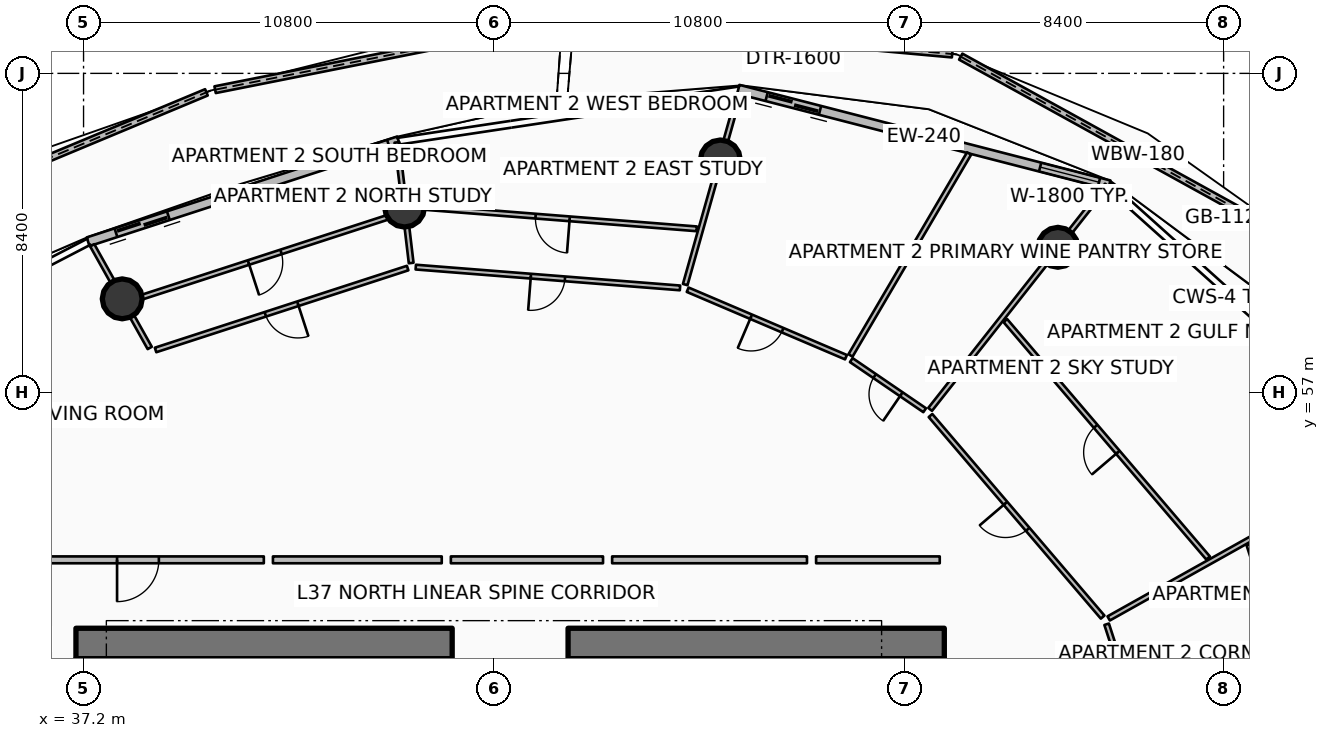
"""IFC4 building model, lengths in metres.
Left out: names, types, materials, properties, quantities, classifications, styles, units other than length and angle.
Written with IfcOpenShell. Run it as: python <this file> out.ifc"""

import sys

from ifc_helpers import new_model, si_unit, direction, frame, frame_2d, origin, origin_2d, place, context, subcontext, project, spatial, polyline, rectangle, circle, outline, extrude, element, fill, save


model = new_model("IFC4")
c1 = context("Model", 3, precision=1e-05, world=origin(), true_north=direction((0.0, 1.0)))
c2 = subcontext(c1, "Body", "Model", "MODEL_VIEW")
j1 = project(units=[si_unit("LENGTHUNIT", "METRE"), si_unit("PLANEANGLEUNIT", "RADIAN")], contexts=[c1])
p1 = place(None, origin())
s1 = spatial("IfcSite", under=j1, at=p1, CompositionType="ELEMENT")
p2 = place(p1, origin())
s2 = spatial("IfcBuilding", under=s1, at=p2, CompositionType="ELEMENT")
p3 = place(p2, frame((0.0, 0.0, 150.3)))
s3 = spatial("IfcBuildingStorey", under=s2, at=p3, CompositionType="ELEMENT", Elevation=150.3)
p4 = place(p3, frame((37.0, 50.4, 0.0), z_axis=(0.0, 0.0, 1.0), x_axis=(1.0, 0.0, 0.0)))
e1 = element("IfcWall", 1, at=p4, inside=s3, PredefinedType="SHEAR", context=c2, shape_type="SweptSolid", body=[
    extrude(rectangle(XDim=9.9, YDim=0.8, at=frame_2d((4.95, 0.0))), origin(), (0.0, 0.0, 1.0), 3.75),
])
p5 = place(p3, frame((49.95, 50.4, 0.0), z_axis=(0.0, 0.0, 1.0), x_axis=(1.0, 0.0, 0.0)))
e2 = element("IfcWall", 2, at=p5, inside=s3, PredefinedType="SHEAR", context=c2, shape_type="SweptSolid", body=[
    extrude(rectangle(XDim=9.9, YDim=0.8, at=frame_2d((4.95, 0.0))), origin(), (0.0, 0.0, 1.0), 3.75),
])
for number, where, z_axis, x_axis in (
    (3, (62.84, 60.824, 0.0), (0.0, 0.0, 1.0), (1.0, 0.0, 0.0)),
    (4, (53.957, 63.122, 0.0), (0.0, 0.0, 1.0), (1.0, 0.0, 0.0)),
    (5, (45.647, 61.881, 0.0), (0.0, 0.0, 1.0), (1.0, 0.0, 0.0)),
    (6, (38.218, 59.467, 0.0), (0.0, 0.0, 1.0), (1.0, 0.0, 0.0)),
):
    element("IfcColumn", number, at=place(p3, frame(where, z_axis=z_axis, x_axis=x_axis)), inside=s3, PredefinedType="COLUMN", context=c2, shape_type="SweptSolid", body=[
        extrude(circle(Radius=0.525, at=origin_2d()), origin(), (0.0, 0.0, 1.0), 3.5),
    ])
p6 = place(p3, frame((69.614, 60.689, 0.0), z_axis=(0.0, 0.0, 1.0), x_axis=(-0.875451711427, 0.483305597897, 0.0)))
e7 = element("IfcWall", 7, at=p6, inside=s3, PredefinedType="PARAPET", context=c2, shape_type="SweptSolid", body=[
    extrude(outline(polyline([(0.0, 0.0), (10.659, 0.0), (10.659, 1.148), (5.33, 1.127), (0.0, 1.224), (0.0, 0.0)])), frame((0.0, 0.09, 0.0), z_axis=(0.0, -1.0, 0.0), x_axis=(1.0, 0.0, 0.0)), (0.0, 0.0, 1.0), 0.18),
])
p7 = place(p3, frame((60.058, 65.909, 0.0), z_axis=(0.0, 0.0, 1.0), x_axis=(-0.995910609801, 0.09034410487, 0.0)))
e8 = element("IfcWall", 8, at=p7, inside=s3, PredefinedType="PARAPET", context=c2, shape_type="SweptSolid", body=[
    extrude(outline(polyline([(0.0, 0.0), (9.993, 0.0), (9.993, 1.483), (4.997, 1.284), (0.0, 1.148), (0.0, 0.0)])), frame((0.0, 0.09, 0.0), z_axis=(0.0, -1.0, 0.0), x_axis=(1.0, 0.0, 0.0)), (0.0, 0.0, 1.0), 0.18),
])
p8 = place(p3, frame((49.799, 66.787, 0.0), z_axis=(0.0, 0.0, 1.0), x_axis=(-0.980810829075, -0.194961836188, 0.0)))
e9 = element("IfcWall", 9, at=p8, inside=s3, PredefinedType="PARAPET", context=c2, shape_type="SweptSolid", body=[
    extrude(outline(polyline([(0.0, 0.0), (9.315, 0.0), (9.315, 1.832), (4.658, 1.696), (0.0, 1.497), (0.0, 0.0)])), frame((0.0, 0.09, 0.0), z_axis=(0.0, -1.0, 0.0), x_axis=(1.0, 0.0, 0.0)), (0.0, 0.0, 1.0), 0.18),
])
p9 = place(p3, frame((40.433, 64.901, 0.0), z_axis=(0.0, 0.0, 1.0), x_axis=(-0.922918869306, -0.384994494349, 0.0)))
e10 = element("IfcWall", 10, at=p9, inside=s3, PredefinedType="PARAPET", context=c2, shape_type="SweptSolid", body=[
    extrude(outline(polyline([(0.0, 0.0), (9.419, 0.0), (9.419, 1.756), (4.709, 1.853), (0.0, 1.832), (0.0, 0.0)])), frame((0.0, 0.09, 0.0), z_axis=(0.0, -1.0, 0.0), x_axis=(1.0, 0.0, 0.0)), (0.0, 0.0, 1.0), 0.18),
])
p10 = place(p3, frame((64.192, 62.466, 0.0), z_axis=(0.0, 0.0, 1.0), x_axis=(-0.968379685126, 0.249481032214, 0.0)))
e11 = element("IfcWall", 11, at=p10, inside=s3, PredefinedType="SOLIDWALL", context=c2, shape_type="SweptSolid", body=[
    extrude(rectangle(XDim=10.082, YDim=0.24, at=frame_2d((5.041, 0.0))), origin(), (0.0, 0.0, 1.0), 2.45),
])
p11 = place(p10, frame((7.862, 0.0, 0.0)))
e12 = element("IfcOpeningElement", 12, at=p11, cuts=e11, PredefinedType="OPENING", context=c2, shape_type="SweptSolid", body=[
    extrude(rectangle(XDim=1.45, YDim=2.15, at=frame_2d((0.725, 1.075))), frame((0.0, 0.13, 0.0), z_axis=(0.0, -1.0, 0.0), x_axis=(1.0, 0.0, 0.0)), (0.0, 0.0, 1.0), 0.26),
])
p12 = place(p10, frame((0.28, 0.0, 0.65)))
e13 = element("IfcOpeningElement", 13, at=p12, cuts=e11, PredefinedType="OPENING", context=c2, shape_type="SweptSolid", body=[
    extrude(rectangle(XDim=1.6, YDim=1.5, at=frame_2d((0.8, 0.75))), frame((0.0, 0.13, 0.0), z_axis=(0.0, -1.0, 0.0), x_axis=(1.0, 0.0, 0.0)), (0.0, 0.0, 1.0), 0.26),
])
p13 = place(p3, frame((45.49, 63.624, 0.0), z_axis=(0.0, 0.0, 1.0), x_axis=(-0.951046390632, -0.309048156224, 0.0)))
e14 = element("IfcWall", 14, at=p13, inside=s3, PredefinedType="SOLIDWALL", context=c2, shape_type="SweptSolid", body=[
    extrude(rectangle(XDim=8.59, YDim=0.24, at=frame_2d((4.295, 0.0))), origin(), (0.0, 0.0, 1.0), 2.45),
])
p14 = place(p13, frame((6.37, 0.0, 0.0)))
e15 = element("IfcOpeningElement", 15, at=p14, cuts=e14, PredefinedType="OPENING", context=c2, shape_type="SweptSolid", body=[
    extrude(rectangle(XDim=1.45, YDim=2.15, at=frame_2d((0.725, 1.075))), frame((0.0, 0.13, 0.0), z_axis=(0.0, -1.0, 0.0), x_axis=(1.0, 0.0, 0.0)), (0.0, 0.0, 1.0), 0.26),
])
p15 = place(p13, frame((0.28, 0.0, 0.65)))
e16 = element("IfcOpeningElement", 16, at=p15, cuts=e14, PredefinedType="OPENING", context=c2, shape_type="SweptSolid", body=[
    extrude(rectangle(XDim=1.6, YDim=1.5, at=frame_2d((0.8, 0.75))), frame((0.0, 0.13, 0.0), z_axis=(0.0, -1.0, 0.0), x_axis=(1.0, 0.0, 0.0)), (0.0, 0.0, 1.0), 0.26),
])
p16 = place(p3, frame((41.944, 52.6, 0.0), z_axis=(0.0, 0.0, 1.0), x_axis=(-1.0, 0.0, 0.0)))
e17 = element("IfcWall", 17, at=p16, inside=s3, PredefinedType="PARTITIONING", context=c2, shape_type="SweptSolid", body=[
    extrude(rectangle(XDim=6.624, YDim=0.18, at=frame_2d((3.312, 0.0))), origin(), (0.0, 0.0, 1.0), 2.94),
])
p17 = place(p16, frame((2.762, 0.0, 0.0)))
e18 = element("IfcOpeningElement", 18, at=p17, cuts=e17, PredefinedType="OPENING", context=c2, shape_type="SweptSolid", body=[
    extrude(rectangle(XDim=1.1, YDim=2.1, at=frame_2d((0.55, 1.05))), frame((0.0, 0.1, 0.0), z_axis=(0.0, -1.0, 0.0), x_axis=(1.0, 0.0, 0.0)), (0.0, 0.0, 1.0), 0.2),
])
p18 = place(p3, frame((66.277, 44.272, 0.0), z_axis=(0.0, 0.0, 1.0), x_axis=(-0.308993461661, 0.951064162215, 0.0)))
e19 = element("IfcWall", 19, at=p18, inside=s3, PredefinedType="PARTITIONING", context=c2, shape_type="SweptSolid", body=[
    extrude(rectangle(XDim=6.974, YDim=0.125, at=frame_2d((3.487, 0.0))), origin(), (0.0, 0.0, 1.0), 2.94),
])
p19 = place(p18, frame((3.037, 0.0, 0.0)))
e20 = element("IfcOpeningElement", 20, at=p19, cuts=e19, PredefinedType="OPENING", context=c2, shape_type="SweptSolid", body=[
    extrude(rectangle(XDim=0.9, YDim=2.08, at=frame_2d((0.45, 1.04))), frame((0.0, 0.073, 0.0), z_axis=(0.0, -1.0, 0.0), x_axis=(1.0, 0.0, 0.0)), (0.0, 0.0, 1.0), 0.145),
])
p20 = place(p3, frame((70.535, 44.776, 0.0), z_axis=(0.0, 0.0, 1.0), x_axis=(-0.309002443549, 0.951061244022, 0.0)))
e21 = element("IfcWall", 21, at=p20, inside=s3, PredefinedType="PARTITIONING", context=c2, shape_type="SweptSolid", body=[
    extrude(rectangle(XDim=8.647, YDim=0.125, at=frame_2d((4.324, 0.0))), origin(), (0.0, 0.0, 1.0), 2.94),
])
p21 = place(p20, frame((3.874, 0.0, 0.0)))
e22 = element("IfcOpeningElement", 22, at=p21, cuts=e21, PredefinedType="OPENING", context=c2, shape_type="SweptSolid", body=[
    extrude(rectangle(XDim=0.9, YDim=2.08, at=frame_2d((0.45, 1.04))), frame((0.0, 0.073, 0.0), z_axis=(0.0, -1.0, 0.0), x_axis=(1.0, 0.0, 0.0)), (0.0, 0.0, 1.0), 0.145),
])
p22 = place(p3, frame((59.73, 52.6, 0.0), z_axis=(0.0, 0.0, 1.0), x_axis=(-1.0, 0.0, 0.0)))
e23 = element("IfcWall", 23, at=p22, inside=s3, PredefinedType="PARTITIONING", context=c2, shape_type="SweptSolid", body=[
    extrude(rectangle(XDim=3.254, YDim=0.18, at=frame_2d((1.627, 0.0))), origin(), (0.0, 0.0, 1.0), 2.94),
])
p23 = place(p3, frame((64.175, 51.059, 0.0), z_axis=(0.0, 0.0, 1.0), x_axis=(0.872491881101, 0.488628608877, 0.0)))
e24 = element("IfcWall", 24, at=p23, inside=s3, PredefinedType="PARTITIONING", context=c2, shape_type="SweptSolid", body=[
    extrude(rectangle(XDim=8.247, YDim=0.125, at=frame_2d((4.124, 0.0))), origin(), (0.0, 0.0, 1.0), 2.94),
])
p24 = place(p3, frame((64.017, 51.093, 0.0), z_axis=(0.0, 0.0, 1.0), x_axis=(-0.649447060425, 0.76040680935, 0.0)))
e25 = element("IfcWall", 25, at=p24, inside=s3, PredefinedType="PARTITIONING", context=c2, shape_type="SweptSolid", body=[
    extrude(rectangle(XDim=6.975, YDim=0.125, at=frame_2d((3.487, 0.0))), origin(), (0.0, 0.0, 1.0), 2.94),
])
p25 = place(p24, frame((3.037, 0.0, 0.0)))
e26 = element("IfcOpeningElement", 26, at=p25, cuts=e25, PredefinedType="OPENING", context=c2, shape_type="SweptSolid", body=[
    extrude(rectangle(XDim=0.9, YDim=2.08, at=frame_2d((0.45, 1.04))), frame((0.0, 0.073, 0.0), z_axis=(0.0, -1.0, 0.0), x_axis=(1.0, 0.0, 0.0)), (0.0, 0.0, 1.0), 0.145),
])
p26 = place(p3, frame((66.792, 52.648, 0.0), z_axis=(0.0, 0.0, 1.0), x_axis=(-0.649446834215, 0.76040700255, 0.0)))
e27 = element("IfcWall", 27, at=p26, inside=s3, PredefinedType="PARTITIONING", context=c2, shape_type="SweptSolid", body=[
    extrude(rectangle(XDim=8.216, YDim=0.125, at=frame_2d((4.108, 0.0))), origin(), (0.0, 0.0, 1.0), 2.94),
])
p27 = place(p26, frame((3.658, 0.0, 0.0)))
e28 = element("IfcOpeningElement", 28, at=p27, cuts=e27, PredefinedType="OPENING", context=c2, shape_type="SweptSolid", body=[
    extrude(rectangle(XDim=0.9, YDim=2.08, at=frame_2d((0.45, 1.04))), frame((0.0, 0.073, 0.0), z_axis=(0.0, -1.0, 0.0), x_axis=(1.0, 0.0, 0.0)), (0.0, 0.0, 1.0), 0.145),
])
p28 = place(p3, frame((56.236, 52.6, 0.0), z_axis=(0.0, 0.0, 1.0), x_axis=(-1.0, 0.0, 0.0)))
e29 = element("IfcWall", 29, at=p28, inside=s3, PredefinedType="PARTITIONING", context=c2, shape_type="SweptSolid", body=[
    extrude(rectangle(XDim=5.127, YDim=0.18, at=frame_2d((2.563, 0.0))), origin(), (0.0, 0.0, 1.0), 2.94),
])
p29 = place(p3, frame((59.477, 56.559, 0.0), z_axis=(0.0, 0.0, 1.0), x_axis=(0.619110986016, 0.785303499925, 0.0)))
e30 = element("IfcWall", 30, at=p29, inside=s3, PredefinedType="PARTITIONING", context=c2, shape_type="SweptSolid", body=[
    extrude(rectangle(XDim=7.513, YDim=0.125, at=frame_2d((3.756, 0.0))), origin(), (0.0, 0.0, 1.0), 2.94),
])
p30 = place(p3, frame((57.382, 57.978, 0.0), z_axis=(0.0, 0.0, 1.0), x_axis=(0.506339561396, 0.862334186128, 0.0)))
e31 = element("IfcWall", 31, at=p30, inside=s3, PredefinedType="PARTITIONING", context=c2, shape_type="SweptSolid", body=[
    extrude(rectangle(XDim=6.163, YDim=0.125, at=frame_2d((3.081, 0.0))), origin(), (0.0, 0.0, 1.0), 2.94),
])
p31 = place(p3, frame((59.333, 56.537, 0.0), z_axis=(0.0, 0.0, 1.0), x_axis=(-0.825780816813, 0.563991172434, 0.0)))
e32 = element("IfcWall", 32, at=p31, inside=s3, PredefinedType="PARTITIONING", context=c2, shape_type="SweptSolid", body=[
    extrude(rectangle(XDim=2.338, YDim=0.125, at=frame_2d((1.169, 0.0))), origin(), (0.0, 0.0, 1.0), 2.94),
])
p32 = place(p31, frame((0.744, 0.0, 0.0)))
e33 = element("IfcOpeningElement", 33, at=p32, cuts=e32, PredefinedType="OPENING", context=c2, shape_type="SweptSolid", body=[
    extrude(rectangle(XDim=0.85, YDim=2.06, at=frame_2d((0.425, 1.03))), frame((0.0, 0.073, 0.0), z_axis=(0.0, -1.0, 0.0), x_axis=(1.0, 0.0, 0.0)), (0.0, 0.0, 1.0), 0.145),
])
p33 = place(p3, frame((57.263, 57.932, 0.0), z_axis=(0.0, 0.0, 1.0), x_axis=(-0.919910192906, 0.392129107549, 0.0)))
e34 = element("IfcWall", 34, at=p33, inside=s3, PredefinedType="PARTITIONING", context=c2, shape_type="SweptSolid", body=[
    extrude(rectangle(XDim=4.528, YDim=0.125, at=frame_2d((2.264, 0.0))), origin(), (0.0, 0.0, 1.0), 2.94),
])
p34 = place(p33, frame((1.814, 0.0, 0.0)))
e35 = element("IfcOpeningElement", 35, at=p34, cuts=e34, PredefinedType="OPENING", context=c2, shape_type="SweptSolid", body=[
    extrude(rectangle(XDim=0.9, YDim=2.08, at=frame_2d((0.45, 1.04))), frame((0.0, 0.073, 0.0), z_axis=(0.0, -1.0, 0.0), x_axis=(1.0, 0.0, 0.0)), (0.0, 0.0, 1.0), 0.145),
])
p35 = place(p3, frame((50.869, 52.6, 0.0), z_axis=(0.0, 0.0, 1.0), x_axis=(-1.0, 0.0, 0.0)))
e36 = element("IfcWall", 36, at=p35, inside=s3, PredefinedType="PARTITIONING", context=c2, shape_type="SweptSolid", body=[
    extrude(rectangle(XDim=4.004, YDim=0.18, at=frame_2d((2.002, 0.0))), origin(), (0.0, 0.0, 1.0), 2.94),
])
p36 = place(p3, frame((53.032, 59.843, 0.0), z_axis=(0.0, 0.0, 1.0), x_axis=(0.271445669276, 0.962453764412, 0.0)))
e37 = element("IfcWall", 37, at=p36, inside=s3, PredefinedType="PARTITIONING", context=c2, shape_type="SweptSolid", body=[
    extrude(rectangle(XDim=5.2, YDim=0.125, at=frame_2d((2.6, 0.0))), origin(), (0.0, 0.0, 1.0), 2.94),
])
p37 = place(p3, frame((52.896, 59.755, 0.0), z_axis=(0.0, 0.0, 1.0), x_axis=(-0.996918496177, 0.078444324085, 0.0)))
e38 = element("IfcWall", 38, at=p37, inside=s3, PredefinedType="PARTITIONING", context=c2, shape_type="SweptSolid", body=[
    extrude(rectangle(XDim=6.975, YDim=0.125, at=frame_2d((3.487, 0.0))), origin(), (0.0, 0.0, 1.0), 2.94),
])
p38 = place(p37, frame((3.037, 0.0, 0.0)))
e39 = element("IfcOpeningElement", 39, at=p38, cuts=e38, PredefinedType="OPENING", context=c2, shape_type="SweptSolid", body=[
    extrude(rectangle(XDim=0.9, YDim=2.08, at=frame_2d((0.45, 1.04))), frame((0.0, 0.073, 0.0), z_axis=(0.0, -1.0, 0.0), x_axis=(1.0, 0.0, 0.0)), (0.0, 0.0, 1.0), 0.145),
])
p39 = place(p3, frame((53.334, 61.31, 0.0), z_axis=(0.0, 0.0, 1.0), x_axis=(-0.996916945499, 0.078464028559, 0.0)))
e40 = element("IfcWall", 40, at=p39, inside=s3, PredefinedType="PARTITIONING", context=c2, shape_type="SweptSolid", body=[
    extrude(rectangle(XDim=7.604, YDim=0.125, at=frame_2d((3.802, 0.0))), origin(), (0.0, 0.0, 1.0), 2.94),
])
p40 = place(p39, frame((3.352, 0.0, 0.0)))
e41 = element("IfcOpeningElement", 41, at=p40, cuts=e40, PredefinedType="OPENING", context=c2, shape_type="SweptSolid", body=[
    extrude(rectangle(XDim=0.9, YDim=2.08, at=frame_2d((0.45, 1.04))), frame((0.0, 0.073, 0.0), z_axis=(0.0, -1.0, 0.0), x_axis=(1.0, 0.0, 0.0)), (0.0, 0.0, 1.0), 0.145),
])
p41 = place(p3, frame((46.625, 52.6, 0.0), z_axis=(0.0, 0.0, 1.0), x_axis=(-1.0, 0.0, 0.0)))
e42 = element("IfcWall", 42, at=p41, inside=s3, PredefinedType="PARTITIONING", context=c2, shape_type="SweptSolid", body=[
    extrude(rectangle(XDim=4.442, YDim=0.18, at=frame_2d((2.221, 0.0))), origin(), (0.0, 0.0, 1.0), 2.94),
])
p42 = place(p3, frame((45.821, 60.41, 0.0), z_axis=(0.0, 0.0, 1.0), x_axis=(-0.117497237937, 0.993073209324, 0.0)))
e43 = element("IfcWall", 43, at=p42, inside=s3, PredefinedType="PARTITIONING", context=c2, shape_type="SweptSolid", body=[
    extrude(rectangle(XDim=3.196, YDim=0.125, at=frame_2d((1.598, 0.0))), origin(), (0.0, 0.0, 1.0), 2.94),
])
p43 = place(p3, frame((38.941, 58.175, 0.0), z_axis=(0.0, 0.0, 1.0), x_axis=(-0.488620181058, 0.872496600946, 0.0)))
e44 = element("IfcWall", 44, at=p43, inside=s3, PredefinedType="PARTITIONING", context=c2, shape_type="SweptSolid", body=[
    extrude(rectangle(XDim=3.095, YDim=0.125, at=frame_2d((1.548, 0.0))), origin(), (0.0, 0.0, 1.0), 2.94),
])
p44 = place(p3, frame((45.728, 60.277, 0.0), z_axis=(0.0, 0.0, 1.0), x_axis=(-0.951064162215, -0.308993461661, 0.0)))
e45 = element("IfcWall", 45, at=p44, inside=s3, PredefinedType="PARTITIONING", context=c2, shape_type="SweptSolid", body=[
    extrude(rectangle(XDim=6.974, YDim=0.125, at=frame_2d((3.487, 0.0))), origin(), (0.0, 0.0, 1.0), 2.94),
])
p45 = place(p44, frame((3.037, 0.0, 0.0)))
e46 = element("IfcOpeningElement", 46, at=p45, cuts=e45, PredefinedType="OPENING", context=c2, shape_type="SweptSolid", body=[
    extrude(rectangle(XDim=0.9, YDim=2.08, at=frame_2d((0.45, 1.04))), frame((0.0, 0.073, 0.0), z_axis=(0.0, -1.0, 0.0), x_axis=(1.0, 0.0, 0.0)), (0.0, 0.0, 1.0), 0.145),
])
p46 = place(p3, frame((45.556, 61.728, 0.0), z_axis=(0.0, 0.0, 1.0), x_axis=(-0.951060224054, -0.309005582834, 0.0)))
e47 = element("IfcWall", 47, at=p46, inside=s3, PredefinedType="PARTITIONING", context=c2, shape_type="SweptSolid", body=[
    extrude(rectangle(XDim=7.544, YDim=0.125, at=frame_2d((3.772, 0.0))), origin(), (0.0, 0.0, 1.0), 2.94),
])
p47 = place(p46, frame((3.322, 0.0, 0.0)))
e48 = element("IfcOpeningElement", 48, at=p47, cuts=e47, PredefinedType="OPENING", context=c2, shape_type="SweptSolid", body=[
    extrude(rectangle(XDim=0.9, YDim=2.08, at=frame_2d((0.45, 1.04))), frame((0.0, 0.073, 0.0), z_axis=(0.0, -1.0, 0.0), x_axis=(1.0, 0.0, 0.0)), (0.0, 0.0, 1.0), 0.145),
])
p48 = place(p11, origin())
e49 = element("IfcDoor", 49, at=p48, inside=s3, OperationType="DOUBLE_DOOR_SLIDING", PredefinedType="DOOR", context=c2, shape_type="SweptSolid", body=[
    extrude(rectangle(XDim=1.45, YDim=2.15, at=frame_2d((0.725, 1.075))), frame((0.0, 0.025, 0.0), z_axis=(0.0, -1.0, 0.0), x_axis=(1.0, 0.0, 0.0)), (0.0, 0.0, 1.0), 0.05),
])
fill(e12, e49)
p49 = place(p12, origin())
e50 = element("IfcWindow", 50, at=p49, inside=s3, PartitioningType="SINGLE_PANEL", PredefinedType="WINDOW", context=c2, shape_type="SweptSolid", body=[
    extrude(rectangle(XDim=1.6, YDim=1.5, at=frame_2d((0.8, 0.75))), frame((0.0, 0.03, 0.0), z_axis=(0.0, -1.0, 0.0), x_axis=(1.0, 0.0, 0.0)), (0.0, 0.0, 1.0), 0.06),
])
fill(e13, e50)
p50 = place(p14, origin())
e51 = element("IfcDoor", 51, at=p50, inside=s3, OperationType="DOUBLE_DOOR_SLIDING", PredefinedType="DOOR", context=c2, shape_type="SweptSolid", body=[
    extrude(rectangle(XDim=1.45, YDim=2.15, at=frame_2d((0.725, 1.075))), frame((0.0, 0.025, 0.0), z_axis=(0.0, -1.0, 0.0), x_axis=(1.0, 0.0, 0.0)), (0.0, 0.0, 1.0), 0.05),
])
fill(e15, e51)
p51 = place(p15, origin())
e52 = element("IfcWindow", 52, at=p51, inside=s3, PartitioningType="SINGLE_PANEL", PredefinedType="WINDOW", context=c2, shape_type="SweptSolid", body=[
    extrude(rectangle(XDim=1.6, YDim=1.5, at=frame_2d((0.8, 0.75))), frame((0.0, 0.03, 0.0), z_axis=(0.0, -1.0, 0.0), x_axis=(1.0, 0.0, 0.0)), (0.0, 0.0, 1.0), 0.06),
])
fill(e16, e52)
p52 = place(p17, origin())
e53 = element("IfcDoor", 53, at=p52, inside=s3, OperationType="SINGLE_SWING_RIGHT", PredefinedType="DOOR", context=c2, shape_type="SweptSolid", body=[
    extrude(rectangle(XDim=1.1, YDim=2.1, at=frame_2d((0.55, 1.05))), frame((0.0, 0.025, 0.0), z_axis=(0.0, -1.0, 0.0), x_axis=(1.0, 0.0, 0.0)), (0.0, 0.0, 1.0), 0.05),
])
fill(e18, e53)
p53 = place(p25, origin())
e54 = element("IfcDoor", 54, at=p53, inside=s3, OperationType="SINGLE_SWING_RIGHT", PredefinedType="DOOR", context=c2, shape_type="SweptSolid", body=[
    extrude(rectangle(XDim=0.9, YDim=2.08, at=frame_2d((0.45, 1.04))), frame((0.0, 0.025, 0.0), z_axis=(0.0, -1.0, 0.0), x_axis=(1.0, 0.0, 0.0)), (0.0, 0.0, 1.0), 0.05),
])
fill(e26, e54)
p54 = place(p27, origin())
e55 = element("IfcDoor", 55, at=p54, inside=s3, OperationType="SINGLE_SWING_LEFT", PredefinedType="DOOR", context=c2, shape_type="SweptSolid", body=[
    extrude(rectangle(XDim=0.9, YDim=2.08, at=frame_2d((0.45, 1.04))), frame((0.0, 0.025, 0.0), z_axis=(0.0, -1.0, 0.0), x_axis=(1.0, 0.0, 0.0)), (0.0, 0.0, 1.0), 0.05),
])
fill(e28, e55)
p55 = place(p32, origin())
e56 = element("IfcDoor", 56, at=p55, inside=s3, OperationType="SINGLE_SWING_LEFT", PredefinedType="DOOR", context=c2, shape_type="SweptSolid", body=[
    extrude(rectangle(XDim=0.85, YDim=2.06, at=frame_2d((0.425, 1.03))), frame((0.0, 0.025, 0.0), z_axis=(0.0, -1.0, 0.0), x_axis=(1.0, 0.0, 0.0)), (0.0, 0.0, 1.0), 0.05),
])
fill(e33, e56)
p56 = place(p34, origin())
e57 = element("IfcDoor", 57, at=p56, inside=s3, OperationType="SINGLE_SWING_RIGHT", PredefinedType="DOOR", context=c2, shape_type="SweptSolid", body=[
    extrude(rectangle(XDim=0.9, YDim=2.08, at=frame_2d((0.45, 1.04))), frame((0.0, 0.025, 0.0), z_axis=(0.0, -1.0, 0.0), x_axis=(1.0, 0.0, 0.0)), (0.0, 0.0, 1.0), 0.05),
])
fill(e35, e57)
p57 = place(p38, origin())
e58 = element("IfcDoor", 58, at=p57, inside=s3, OperationType="SINGLE_SWING_RIGHT", PredefinedType="DOOR", context=c2, shape_type="SweptSolid", body=[
    extrude(rectangle(XDim=0.9, YDim=2.08, at=frame_2d((0.45, 1.04))), frame((0.0, 0.025, 0.0), z_axis=(0.0, -1.0, 0.0), x_axis=(1.0, 0.0, 0.0)), (0.0, 0.0, 1.0), 0.05),
])
fill(e39, e58)
p58 = place(p40, origin())
e59 = element("IfcDoor", 59, at=p58, inside=s3, OperationType="SINGLE_SWING_LEFT", PredefinedType="DOOR", context=c2, shape_type="SweptSolid", body=[
    extrude(rectangle(XDim=0.9, YDim=2.08, at=frame_2d((0.45, 1.04))), frame((0.0, 0.025, 0.0), z_axis=(0.0, -1.0, 0.0), x_axis=(1.0, 0.0, 0.0)), (0.0, 0.0, 1.0), 0.05),
])
fill(e41, e59)
p59 = place(p45, origin())
e60 = element("IfcDoor", 60, at=p59, inside=s3, OperationType="SINGLE_SWING_LEFT", PredefinedType="DOOR", context=c2, shape_type="SweptSolid", body=[
    extrude(rectangle(XDim=0.9, YDim=2.08, at=frame_2d((0.45, 1.04))), frame((0.0, 0.025, 0.0), z_axis=(0.0, -1.0, 0.0), x_axis=(1.0, 0.0, 0.0)), (0.0, 0.0, 1.0), 0.05),
])
fill(e46, e60)
p60 = place(p47, origin())
e61 = element("IfcDoor", 61, at=p60, inside=s3, OperationType="SINGLE_SWING_RIGHT", PredefinedType="DOOR", context=c2, shape_type="SweptSolid", body=[
    extrude(rectangle(XDim=0.9, YDim=2.08, at=frame_2d((0.45, 1.04))), frame((0.0, 0.025, 0.0), z_axis=(0.0, -1.0, 0.0), x_axis=(1.0, 0.0, 0.0)), (0.0, 0.0, 1.0), 0.05),
])
fill(e48, e61)
save(model, sys.argv[1])
